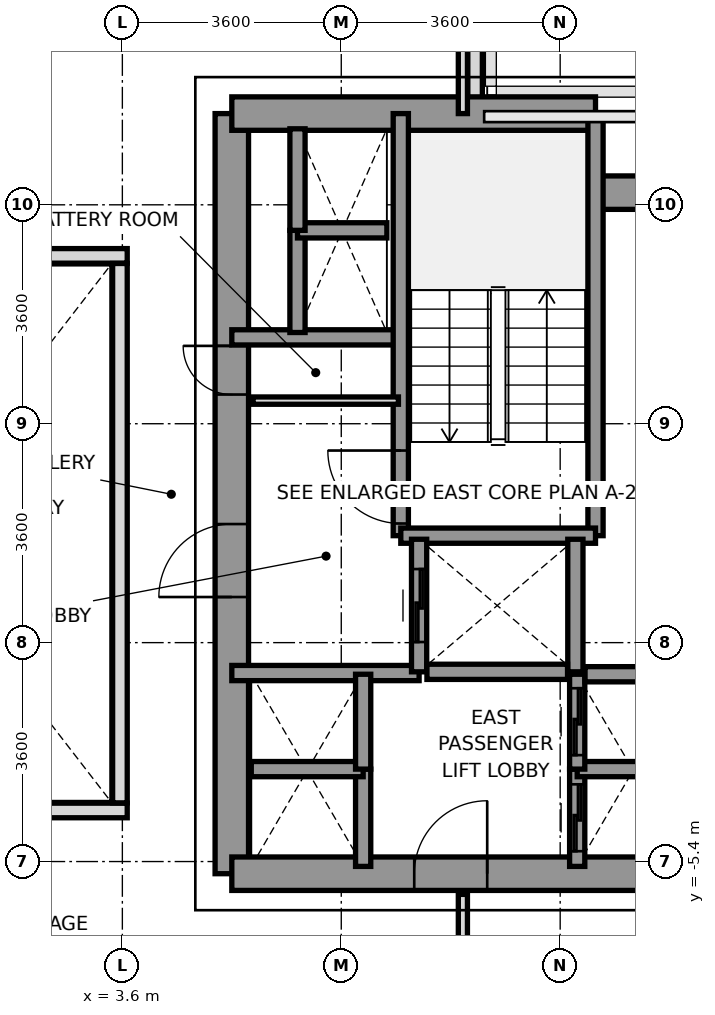
"""IFC4 building model, lengths in metres.
Left out: names, types, materials, properties, quantities, classifications, styles, units other than length and angle.
Written with IfcOpenShell. Run it as: python <this file> out.ifc"""

import sys

from ifc_helpers import new_model, si_unit, direction, frame, frame_2d, origin, place, context, subcontext, project, spatial, rectangle, extrude, source, transform, mapped, element, fill, save


model = new_model("IFC4")
c1 = context("Model", 3, precision=1e-05, world=origin(), true_north=direction((0.0, 1.0)))
c2 = subcontext(c1, "Body", "Model", "MODEL_VIEW")
j1 = project(units=[si_unit("LENGTHUNIT", "METRE"), si_unit("PLANEANGLEUNIT", "RADIAN")], contexts=[c1])
p1 = place(None, origin())
s1 = spatial("IfcSite", under=j1, at=p1, CompositionType="ELEMENT")
p2 = place(p1, origin())
s2 = spatial("IfcBuilding", under=s1, at=p2, CompositionType="ELEMENT")
p3 = place(p2, frame((0.0, 0.0, 61.2)))
s3 = spatial("IfcBuildingStorey", under=s2, at=p3, CompositionType="ELEMENT", Elevation=61.2)
p4 = place(p3, frame((9.4, 8.397, 0.0), z_axis=(0.0, 0.0, 1.0), x_axis=(0.0, -1.0, 0.0)))
e1 = element("IfcWall", 1, at=p4, inside=s3, PredefinedType="PARAPET", context=c2, shape_type="SweptSolid", body=[
    extrude(rectangle(XDim=1.444, YDim=0.24, at=frame_2d((0.722, 0.0))), origin(), (0.0, 0.0, 1.0), 1.15),
])
p5 = place(p3, frame((5.4, -5.6, 0.0), z_axis=(0.0, 0.0, 1.0), x_axis=(0.0, 1.0, 0.0)))
e2 = element("IfcWall", 2, at=p5, inside=s3, PredefinedType="SHEAR", context=c2, shape_type="SweptSolid", body=[
    extrude(rectangle(XDim=12.5, YDim=0.55, at=frame_2d((6.25, 0.0))), origin(), (0.0, 0.0, 1.0), 3.2),
])
p6 = place(p5, frame((4.55, 0.0, 0.0)))
e3 = element("IfcOpeningElement", 3, at=p6, cuts=e2, PredefinedType="OPENING", context=c2, shape_type="SweptSolid", body=[
    extrude(rectangle(XDim=1.2, YDim=2.2, at=frame_2d((0.6, 1.1))), frame((0.0, 0.285, 0.0), z_axis=(0.0, -1.0, 0.0), x_axis=(1.0, 0.0, 0.0)), (0.0, 0.0, 1.0), 0.57),
])
p7 = place(p5, frame((7.88, 0.0, 0.0)))
e4 = element("IfcOpeningElement", 4, at=p7, cuts=e2, PredefinedType="OPENING", context=c2, shape_type="SweptSolid", body=[
    extrude(rectangle(XDim=0.8, YDim=2.1, at=frame_2d((0.4, 1.05))), frame((0.0, 0.285, 0.0), z_axis=(0.0, -1.0, 0.0), x_axis=(1.0, 0.0, 0.0)), (0.0, 0.0, 1.0), 0.57),
])
p8 = place(p3, frame((5.4, 6.9, 0.0), z_axis=(0.0, 0.0, 1.0), x_axis=(1.0, 0.0, 0.0)))
e5 = element("IfcWall", 5, at=p8, inside=s3, PredefinedType="SHEAR", context=c2, shape_type="SweptSolid", body=[
    extrude(rectangle(XDim=5.981, YDim=0.55, at=frame_2d((2.991, 0.0))), origin(), (0.0, 0.0, 1.0), 3.2),
])
p9 = place(p3, frame((11.381, 5.6, 0.0), z_axis=(0.0, 0.0, 1.0), x_axis=(1.0, 0.0, 0.0)))
e6 = element("IfcWall", 6, at=p9, inside=s3, PredefinedType="SHEAR", context=c2, shape_type="SweptSolid", body=[
    extrude(rectangle(XDim=1.819, YDim=0.55, at=frame_2d((0.909, 0.0))), origin(), (0.0, 0.0, 1.0), 3.2),
])
p10 = place(p3, frame((5.4, -5.6, 0.0), z_axis=(0.0, 0.0, 1.0), x_axis=(1.0, 0.0, 0.0)))
e7 = element("IfcWall", 7, at=p10, inside=s3, PredefinedType="SHEAR", context=c2, shape_type="SweptSolid", body=[
    extrude(rectangle(XDim=7.8, YDim=0.55, at=frame_2d((3.9, 0.0))), origin(), (0.0, 0.0, 1.0), 3.2),
])
p11 = place(p10, frame((3.0, 0.0, 0.0)))
e8 = element("IfcOpeningElement", 8, at=p11, cuts=e7, PredefinedType="OPENING", context=c2, shape_type="SweptSolid", body=[
    extrude(rectangle(XDim=1.2, YDim=2.2, at=frame_2d((0.6, 1.1))), frame((0.0, 0.285, 0.0), z_axis=(0.0, -1.0, 0.0), x_axis=(1.0, 0.0, 0.0)), (0.0, 0.0, 1.0), 0.57),
])
p12 = place(p3, frame((5.4, 3.22, 0.0), z_axis=(0.0, 0.0, 1.0), x_axis=(1.0, 0.0, 0.0)))
e9 = element("IfcWall", 9, at=p12, inside=s3, PredefinedType="SOLIDWALL", context=c2, shape_type="SweptSolid", body=[
    extrude(rectangle(XDim=2.78, YDim=0.25, at=frame_2d((1.39, 0.0))), origin(), (0.0, 0.0, 1.0), 3.2),
])
p13 = place(p3, frame((5.4, -2.3, 0.0), z_axis=(0.0, 0.0, 1.0), x_axis=(1.0, 0.0, 0.0)))
e10 = element("IfcWall", 10, at=p13, inside=s3, PredefinedType="SOLIDWALL", context=c2, shape_type="SweptSolid", body=[
    extrude(rectangle(XDim=3.08, YDim=0.25, at=frame_2d((1.54, 0.0))), origin(), (0.0, 0.0, 1.0), 3.2),
])
p14 = place(p3, frame((8.179, -0.041, 0.0), z_axis=(0.0, 0.0, 1.0), x_axis=(0.0, 1.0, 0.0)))
e11 = element("IfcWall", 11, at=p14, inside=s3, PredefinedType="SOLIDWALL", context=c2, shape_type="SweptSolid", body=[
    extrude(rectangle(XDim=6.941, YDim=0.25, at=frame_2d((3.47, 0.0))), origin(), (0.0, 0.0, 1.0), 3.2),
])
p15 = place(p14, frame((0.2, 0.0, 0.0)))
e12 = element("IfcOpeningElement", 12, at=p15, cuts=e11, PredefinedType="OPENING", context=c2, shape_type="SweptSolid", body=[
    extrude(rectangle(XDim=1.2, YDim=2.2, at=frame_2d((0.6, 1.1))), frame((0.0, 0.135, 0.0), z_axis=(0.0, -1.0, 0.0), x_axis=(1.0, 0.0, 0.0)), (0.0, 0.0, 1.0), 0.27),
])
p16 = place(p3, frame((11.381, -0.041, 0.0), z_axis=(0.0, 0.0, 1.0), x_axis=(0.0, 1.0, 0.0)))
e13 = element("IfcWall", 13, at=p16, inside=s3, PredefinedType="SOLIDWALL", context=c2, shape_type="SweptSolid", body=[
    extrude(rectangle(XDim=6.941, YDim=0.25, at=frame_2d((3.47, 0.0))), origin(), (0.0, 0.0, 1.0), 3.2),
])
p17 = place(p3, frame((8.179, -0.041, 0.0), z_axis=(0.0, 0.0, 1.0), x_axis=(1.0, 0.0, 0.0)))
e14 = element("IfcWall", 14, at=p17, inside=s3, PredefinedType="SOLIDWALL", context=c2, shape_type="SweptSolid", body=[
    extrude(rectangle(XDim=3.202, YDim=0.25, at=frame_2d((1.601, 0.0))), origin(), (0.0, 0.0, 1.0), 3.2),
])
p18 = place(p3, frame((8.48, -2.28, 0.0), z_axis=(0.0, 0.0, 1.0), x_axis=(0.0, 1.0, 0.0)))
e15 = element("IfcWall", 15, at=p18, inside=s3, PredefinedType="SOLIDWALL", context=c2, shape_type="SweptSolid", body=[
    extrude(rectangle(XDim=2.18, YDim=0.25, at=frame_2d((1.09, 0.0))), origin(), (0.0, 0.0, 1.0), 3.2),
])
p19 = place(p18, frame((0.49, 0.0, 0.0)))
e16 = element("IfcOpeningElement", 16, at=p19, cuts=e15, PredefinedType="OPENING", context=c2, shape_type="SweptSolid", body=[
    extrude(rectangle(XDim=1.2, YDim=2.2, at=frame_2d((0.6, 1.1))), frame((0.0, 0.135, 0.0), z_axis=(0.0, -1.0, 0.0), x_axis=(1.0, 0.0, 0.0)), (0.0, 0.0, 1.0), 0.27),
])
p20 = place(p3, frame((11.05, -2.28, 0.0), z_axis=(0.0, 0.0, 1.0), x_axis=(0.0, 1.0, 0.0)))
e17 = element("IfcWall", 17, at=p20, inside=s3, PredefinedType="SOLIDWALL", context=c2, shape_type="SweptSolid", body=[
    extrude(rectangle(XDim=2.18, YDim=0.25, at=frame_2d((1.09, 0.0))), origin(), (0.0, 0.0, 1.0), 3.2),
])
p21 = place(p3, frame((8.609, -2.28, 0.0), z_axis=(0.0, 0.0, 1.0), x_axis=(1.0, 0.0, 0.0)))
e18 = element("IfcWall", 18, at=p21, inside=s3, PredefinedType="SOLIDWALL", context=c2, shape_type="SweptSolid", body=[
    extrude(rectangle(XDim=2.312, YDim=0.25, at=frame_2d((1.156, 0.0))), origin(), (0.0, 0.0, 1.0), 3.2),
])
p22 = place(p3, frame((11.08, -5.48, 0.0), z_axis=(0.0, 0.0, 1.0), x_axis=(0.0, 1.0, 0.0)))
e19 = element("IfcWall", 19, at=p22, inside=s3, PredefinedType="SOLIDWALL", context=c2, shape_type="SweptSolid", body=[
    extrude(rectangle(XDim=1.6, YDim=0.25, at=frame_2d((0.8, 0.0))), origin(), (0.0, 0.0, 1.0), 3.2),
])
p23 = place(p22, frame((0.25, 0.0, 0.0)))
e20 = element("IfcOpeningElement", 20, at=p23, cuts=e19, PredefinedType="OPENING", context=c2, shape_type="SweptSolid", body=[
    extrude(rectangle(XDim=1.1, YDim=2.2, at=frame_2d((0.55, 1.1))), frame((0.0, 0.135, 0.0), z_axis=(0.0, -1.0, 0.0), x_axis=(1.0, 0.0, 0.0)), (0.0, 0.0, 1.0), 0.27),
])
p24 = place(p3, frame((11.08, -3.88, 0.0), z_axis=(0.0, 0.0, 1.0), x_axis=(1.0, 0.0, 0.0)))
e21 = element("IfcWall", 21, at=p24, inside=s3, PredefinedType="SOLIDWALL", context=c2, shape_type="SweptSolid", body=[
    extrude(rectangle(XDim=1.84, YDim=0.25, at=frame_2d((0.92, 0.0))), origin(), (0.0, 0.0, 1.0), 3.2),
])
p25 = place(p3, frame((11.08, -3.88, 0.0), z_axis=(0.0, 0.0, 1.0), x_axis=(0.0, 1.0, 0.0)))
e22 = element("IfcWall", 22, at=p25, inside=s3, PredefinedType="SOLIDWALL", context=c2, shape_type="SweptSolid", body=[
    extrude(rectangle(XDim=1.56, YDim=0.25, at=frame_2d((0.78, 0.0))), origin(), (0.0, 0.0, 1.0), 3.2),
])
p26 = place(p25, frame((0.23, 0.0, 0.0)))
e23 = element("IfcOpeningElement", 23, at=p26, cuts=e22, PredefinedType="OPENING", context=c2, shape_type="SweptSolid", body=[
    extrude(rectangle(XDim=1.1, YDim=2.2, at=frame_2d((0.55, 1.1))), frame((0.0, 0.135, 0.0), z_axis=(0.0, -1.0, 0.0), x_axis=(1.0, 0.0, 0.0)), (0.0, 0.0, 1.0), 0.27),
])
p27 = place(p3, frame((11.209, -2.32, 0.0), z_axis=(0.0, 0.0, 1.0), x_axis=(1.0, 0.0, 0.0)))
e24 = element("IfcWall", 24, at=p27, inside=s3, PredefinedType="SOLIDWALL", context=c2, shape_type="SweptSolid", body=[
    extrude(rectangle(XDim=1.582, YDim=0.25, at=frame_2d((0.791, 0.0))), origin(), (0.0, 0.0, 1.0), 3.2),
])
p28 = place(p3, frame((7.56, -5.48, 0.0), z_axis=(0.0, 0.0, 1.0), x_axis=(0.0, 1.0, 0.0)))
e25 = element("IfcWall", 25, at=p28, inside=s3, PredefinedType="SOLIDWALL", context=c2, shape_type="SweptSolid", body=[
    extrude(rectangle(XDim=1.6, YDim=0.25, at=frame_2d((0.8, 0.0))), origin(), (0.0, 0.0, 1.0), 3.2),
])
p29 = place(p3, frame((5.72, -3.88, 0.0), z_axis=(0.0, 0.0, 1.0), x_axis=(1.0, 0.0, 0.0)))
e26 = element("IfcWall", 26, at=p29, inside=s3, PredefinedType="SOLIDWALL", context=c2, shape_type="SweptSolid", body=[
    extrude(rectangle(XDim=1.84, YDim=0.25, at=frame_2d((0.92, 0.0))), origin(), (0.0, 0.0, 1.0), 3.2),
])
p30 = place(p3, frame((7.56, -3.88, 0.0), z_axis=(0.0, 0.0, 1.0), x_axis=(0.0, 1.0, 0.0)))
e27 = element("IfcWall", 27, at=p30, inside=s3, PredefinedType="SOLIDWALL", context=c2, shape_type="SweptSolid", body=[
    extrude(rectangle(XDim=1.56, YDim=0.25, at=frame_2d((0.78, 0.0))), origin(), (0.0, 0.0, 1.0), 3.2),
])
p31 = place(p3, frame((6.48, 3.3, 0.0), z_axis=(0.0, 0.0, 1.0), x_axis=(0.0, 1.0, 0.0)))
e28 = element("IfcWall", 28, at=p31, inside=s3, PredefinedType="SOLIDWALL", context=c2, shape_type="SweptSolid", body=[
    extrude(rectangle(XDim=1.68, YDim=0.25, at=frame_2d((0.84, 0.0))), origin(), (0.0, 0.0, 1.0), 3.2),
])
p32 = place(p3, frame((6.48, 4.98, 0.0), z_axis=(0.0, 0.0, 1.0), x_axis=(1.0, 0.0, 0.0)))
e29 = element("IfcWall", 29, at=p32, inside=s3, PredefinedType="SOLIDWALL", context=c2, shape_type="SweptSolid", body=[
    extrude(rectangle(XDim=1.47, YDim=0.25, at=frame_2d((0.735, 0.0))), origin(), (0.0, 0.0, 1.0), 3.2),
])
p33 = place(p3, frame((6.48, 4.98, 0.0), z_axis=(0.0, 0.0, 1.0), x_axis=(0.0, 1.0, 0.0)))
e30 = element("IfcWall", 30, at=p33, inside=s3, PredefinedType="SOLIDWALL", context=c2, shape_type="SweptSolid", body=[
    extrude(rectangle(XDim=1.67, YDim=0.25, at=frame_2d((0.835, 0.0))), origin(), (0.0, 0.0, 1.0), 3.2),
])
p34 = place(p3, frame((5.75, 2.18, 0.0), z_axis=(0.0, 0.0, 1.0), x_axis=(1.0, 0.0, 0.0)))
e31 = element("IfcWall", 31, at=p34, inside=s3, PredefinedType="PARTITIONING", context=c2, shape_type="SweptSolid", body=[
    extrude(rectangle(XDim=2.39, YDim=0.12, at=frame_2d((1.195, 0.0))), origin(), (0.0, 0.0, 1.0), 2.3),
])
p35 = place(p3, frame((9.2, 6.9, 0.0), z_axis=(0.0, 0.0, 1.0), x_axis=(0.0, 1.0, 0.0)))
e32 = element("IfcWall", 32, at=p35, inside=s3, PredefinedType="PARTITIONING", context=c2, shape_type="SweptSolid", body=[
    extrude(rectangle(XDim=8.78, YDim=0.15, at=frame_2d((4.39, 0.0))), origin(), (0.0, 0.0, 1.0), 2.71),
])
p36 = place(p3, frame((9.2, -15.68, 0.0), z_axis=(0.0, 0.0, 1.0), x_axis=(0.0, 1.0, 0.0)))
e33 = element("IfcWall", 33, at=p36, inside=s3, PredefinedType="PARTITIONING", context=c2, shape_type="SweptSolid", body=[
    extrude(rectangle(XDim=9.74, YDim=0.15, at=frame_2d((4.87, 0.0))), origin(), (0.0, 0.0, 1.0), 2.71),
])
for number, where, z_axis, x_axis in (
    (34, (-3.68, -4.56, 0.0), (0.0, 0.0, 1.0), (1.0, 0.0, 0.0)),
    (35, (-3.68, 4.56, 0.0), (0.0, 0.0, 1.0), (1.0, 0.0, 0.0)),
):
    element("IfcWall", number, at=place(p3, frame(where, z_axis=z_axis, x_axis=x_axis)), inside=s3, PredefinedType="PARAPET", context=c2, shape_type="SweptSolid", body=[
        extrude(rectangle(XDim=7.36, YDim=0.24, at=frame_2d((3.68, 0.0))), origin(), (0.0, 0.0, 1.0), 1.15),
    ])
p37 = place(p3, frame((3.56, -4.435, 0.0), z_axis=(0.0, 0.0, 1.0), x_axis=(0.0, 1.0, 0.0)))
e36 = element("IfcWall", 36, at=p37, inside=s3, PredefinedType="PARAPET", context=c2, shape_type="SweptSolid", body=[
    extrude(rectangle(XDim=8.87, YDim=0.24, at=frame_2d((4.435, 0.0))), origin(), (0.0, 0.0, 1.0), 1.15),
])
m1 = source(origin(), c2, "Body", "SweptSolid", [
    extrude(rectangle(XDim=1.2, YDim=2.2, at=frame_2d((0.6, 1.1))), frame((0.0, 0.025, 0.0), z_axis=(0.0, -1.0, 0.0), x_axis=(1.0, 0.0, 0.0)), (0.0, 0.0, 1.0), 0.05),
])
p38 = place(p15, origin())
e37 = element("IfcDoor", 37, at=p38, inside=s3, OperationType="SINGLE_SWING_RIGHT", PredefinedType="DOOR", context=c2, shape_type="MappedRepresentation", body=[
    mapped(m1, transform((0.0, 0.0, 0.0), x_axis=(1.0, 0.0, 0.0), y_axis=(0.0, 1.0, 0.0), z_axis=(0.0, 0.0, 1.0), scale=1.0)),
])
fill(e12, e37)
p39 = place(p6, origin())
e38 = element("IfcDoor", 38, at=p39, inside=s3, OperationType="SINGLE_SWING_LEFT", PredefinedType="DOOR", context=c2, shape_type="MappedRepresentation", body=[
    mapped(m1, transform((0.0, 0.0, 0.0), x_axis=(1.0, 0.0, 0.0), y_axis=(0.0, 1.0, 0.0), z_axis=(0.0, 0.0, 1.0), scale=1.0)),
])
fill(e3, e38)
p40 = place(p11, origin())
e39 = element("IfcDoor", 39, at=p40, inside=s3, OperationType="SINGLE_SWING_RIGHT", PredefinedType="DOOR", context=c2, shape_type="MappedRepresentation", body=[
    mapped(m1, transform((0.0, 0.0, 0.0), x_axis=(1.0, 0.0, 0.0), y_axis=(0.0, 1.0, 0.0), z_axis=(0.0, 0.0, 1.0), scale=1.0)),
])
fill(e8, e39)
m2 = source(origin(), c2, "Body", "SweptSolid", [
    extrude(rectangle(XDim=0.8, YDim=2.1, at=frame_2d((0.4, 1.05))), frame((0.0, 0.025, 0.0), z_axis=(0.0, -1.0, 0.0), x_axis=(1.0, 0.0, 0.0)), (0.0, 0.0, 1.0), 0.05),
])
p41 = place(p7, origin())
e40 = element("IfcDoor", 40, at=p41, inside=s3, OperationType="SINGLE_SWING_RIGHT", PredefinedType="DOOR", context=c2, shape_type="MappedRepresentation", body=[
    mapped(m2, transform((0.0, 0.0, 0.0), x_axis=(1.0, 0.0, 0.0), y_axis=(0.0, 1.0, 0.0), z_axis=(0.0, 0.0, 1.0), scale=1.0)),
])
fill(e4, e40)
p42 = place(p19, origin())
e41 = element("IfcDoor", 41, at=p42, inside=s3, OperationType="SLIDING_TO_RIGHT", PredefinedType="DOOR", context=c2, shape_type="MappedRepresentation", body=[
    mapped(m1, transform((0.0, 0.0, 0.0), x_axis=(1.0, 0.0, 0.0), y_axis=(0.0, 1.0, 0.0), z_axis=(0.0, 0.0, 1.0), scale=1.0)),
])
fill(e16, e41)
m3 = source(origin(), c2, "Body", "SweptSolid", [
    extrude(rectangle(XDim=1.1, YDim=2.2, at=frame_2d((0.55, 1.1))), frame((0.0, 0.025, 0.0), z_axis=(0.0, -1.0, 0.0), x_axis=(1.0, 0.0, 0.0)), (0.0, 0.0, 1.0), 0.05),
])
p43 = place(p23, origin())
e42 = element("IfcDoor", 42, at=p43, inside=s3, OperationType="SLIDING_TO_LEFT", PredefinedType="DOOR", context=c2, shape_type="MappedRepresentation", body=[
    mapped(m3, transform((0.0, 0.0, 0.0), x_axis=(1.0, 0.0, 0.0), y_axis=(0.0, 1.0, 0.0), z_axis=(0.0, 0.0, 1.0), scale=1.0)),
])
fill(e20, e42)
p44 = place(p26, origin())
e43 = element("IfcDoor", 43, at=p44, inside=s3, OperationType="SLIDING_TO_LEFT", PredefinedType="DOOR", context=c2, shape_type="MappedRepresentation", body=[
    mapped(m3, transform((0.0, 0.0, 0.0), x_axis=(1.0, 0.0, 0.0), y_axis=(0.0, 1.0, 0.0), z_axis=(0.0, 0.0, 1.0), scale=1.0)),
])
fill(e23, e43)
save(model, sys.argv[1])
